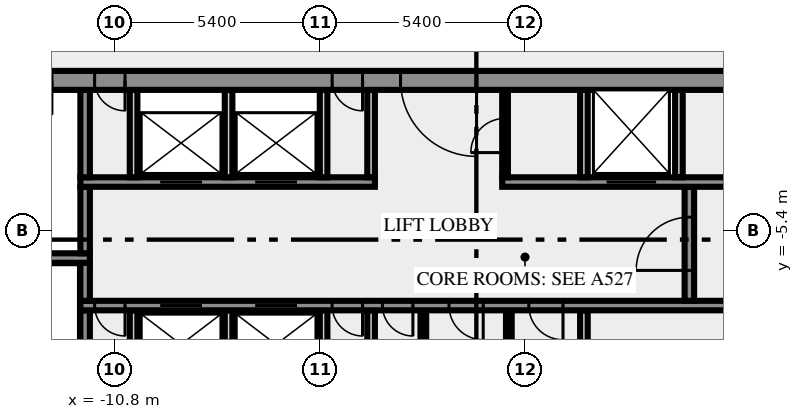
"""IFC4 building model, lengths in metres.
Left out: names, types, materials, properties, quantities, classifications, styles, units other than length and angle.
Written with IfcOpenShell. Run it as: python <this file> out.ifc"""

import sys

from ifc_helpers import new_model, si_unit, direction, frame, frame_2d, origin, place, context, subcontext, project, spatial, rectangle, extrude, element, fill, save


model = new_model("IFC4")
c1 = context("Model", 3, precision=1e-05, world=origin(), true_north=direction((0.0, 1.0)))
c2 = subcontext(c1, "Body", "Model", "MODEL_VIEW")
j1 = project(units=[si_unit("LENGTHUNIT", "METRE"), si_unit("PLANEANGLEUNIT", "RADIAN")], contexts=[c1])
p1 = place(None, origin())
s1 = spatial("IfcSite", under=j1, at=p1, CompositionType="ELEMENT")
p2 = place(p1, origin())
s2 = spatial("IfcBuilding", under=s1, at=p2, CompositionType="ELEMENT")
p3 = place(p2, frame((0.0, 0.0, 347.0)))
s3 = spatial("IfcBuildingStorey", under=s2, at=p3, CompositionType="ELEMENT", Elevation=347.0)
p4 = place(p3, frame((-11.575, -10.5, 0.0), z_axis=(0.0, 0.0, 1.0), x_axis=(0.0, 1.0, 0.0)))
e1 = element("IfcWall", 1, at=p4, inside=s3, PredefinedType="SHEAR", context=c2, shape_type="SweptSolid", body=[
    extrude(rectangle(XDim=3.0, YDim=0.25, at=frame_2d((1.5, 0.0))), origin(), (0.0, 0.0, 1.0), 3.65),
])
for number, where, z_axis, x_axis in (
    (2, (-10.3, -10.5, 0.0), (0.0, 0.0, 1.0), (0.0, 1.0, 0.0)),
    (3, (-7.8, -10.5, 0.0), (0.0, 0.0, 1.0), (0.0, 1.0, 0.0)),
    (4, (-5.3, -10.5, 0.0), (0.0, 0.0, 1.0), (0.0, 1.0, 0.0)),
    (5, (-4.05, -10.5, 0.0), (0.0, 0.0, 1.0), (0.0, 1.0, 0.0)),
):
    element("IfcWall", number, at=place(p3, frame(where, z_axis=z_axis, x_axis=x_axis)), inside=s3, PredefinedType="SOLIDWALL", context=c2, shape_type="SweptSolid", body=[
        extrude(rectangle(XDim=3.0, YDim=0.2, at=frame_2d((1.5, 0.0))), origin(), (0.0, 0.0, 1.0), 3.65),
    ])
for number, where, z_axis, x_axis in (
    (6, (-2.675, -10.5, 0.0), (0.0, 0.0, 1.0), (0.0, 1.0, 0.0)),
    (7, (-0.425, -10.5, 0.0), (0.0, 0.0, 1.0), (0.0, 1.0, 0.0)),
):
    element("IfcWall", number, at=place(p3, frame(where, z_axis=z_axis, x_axis=x_axis)), inside=s3, PredefinedType="PARTITIONING", context=c2, shape_type="SweptSolid", body=[
        extrude(rectangle(XDim=3.0, YDim=0.15, at=frame_2d((1.5, 0.0))), origin(), (0.0, 0.0, 1.0), 3.65),
    ])
p5 = place(p3, frame((1.55, -10.5, 0.0), z_axis=(0.0, 0.0, 1.0), x_axis=(0.0, 1.0, 0.0)))
e8 = element("IfcWall", 8, at=p5, inside=s3, PredefinedType="SOLIDWALL", context=c2, shape_type="SweptSolid", body=[
    extrude(rectangle(XDim=3.0, YDim=0.2, at=frame_2d((1.5, 0.0))), origin(), (0.0, 0.0, 1.0), 3.65),
])
p6 = place(p3, frame((11.7, -7.375, 0.0), z_axis=(0.0, 0.0, 1.0), x_axis=(-1.0, 0.0, 0.0)))
e9 = element("IfcWall", 9, at=p6, inside=s3, PredefinedType="SHEAR", context=c2, shape_type="SweptSolid", body=[
    extrude(rectangle(XDim=23.4, YDim=0.25, at=frame_2d((11.7, 0.0))), origin(), (0.0, 0.0, 1.0), 3.65),
])
p7 = place(p6, frame((22.225, 0.0, 0.0)))
e10 = element("IfcOpeningElement", 10, at=p7, cuts=e9, PredefinedType="OPENING", context=c2, shape_type="SweptSolid", body=[
    extrude(rectangle(XDim=0.8, YDim=2.1, at=frame_2d((0.4, 1.05))), frame((0.0, 0.135, 0.0), z_axis=(0.0, -1.0, 0.0), x_axis=(1.0, 0.0, 0.0)), (0.0, 0.0, 1.0), 0.27),
])
p8 = place(p6, frame((20.2, 0.0, 0.0)))
e11 = element("IfcOpeningElement", 11, at=p8, cuts=e9, PredefinedType="OPENING", context=c2, shape_type="SweptSolid", body=[
    extrude(rectangle(XDim=1.1, YDim=2.1, at=frame_2d((0.55, 1.05))), frame((0.0, 0.135, 0.0), z_axis=(0.0, -1.0, 0.0), x_axis=(1.0, 0.0, 0.0)), (0.0, 0.0, 1.0), 0.27),
])
p9 = place(p6, frame((17.7, 0.0, 0.0)))
e12 = element("IfcOpeningElement", 12, at=p9, cuts=e9, PredefinedType="OPENING", context=c2, shape_type="SweptSolid", body=[
    extrude(rectangle(XDim=1.1, YDim=2.1, at=frame_2d((0.55, 1.05))), frame((0.0, 0.135, 0.0), z_axis=(0.0, -1.0, 0.0), x_axis=(1.0, 0.0, 0.0)), (0.0, 0.0, 1.0), 0.27),
])
p10 = place(p6, frame((15.975, 0.0, 0.0)))
e13 = element("IfcOpeningElement", 13, at=p10, cuts=e9, PredefinedType="OPENING", context=c2, shape_type="SweptSolid", body=[
    extrude(rectangle(XDim=0.8, YDim=2.1, at=frame_2d((0.4, 1.05))), frame((0.0, 0.135, 0.0), z_axis=(0.0, -1.0, 0.0), x_axis=(1.0, 0.0, 0.0)), (0.0, 0.0, 1.0), 0.27),
])
p11 = place(p6, frame((14.65, 0.0, 0.0)))
e14 = element("IfcOpeningElement", 14, at=p11, cuts=e9, PredefinedType="OPENING", context=c2, shape_type="SweptSolid", body=[
    extrude(rectangle(XDim=0.8, YDim=2.1, at=frame_2d((0.4, 1.05))), frame((0.0, 0.135, 0.0), z_axis=(0.0, -1.0, 0.0), x_axis=(1.0, 0.0, 0.0)), (0.0, 0.0, 1.0), 0.27),
])
p12 = place(p6, frame((12.8, 0.0, 0.0)))
e15 = element("IfcOpeningElement", 15, at=p12, cuts=e9, PredefinedType="OPENING", context=c2, shape_type="SweptSolid", body=[
    extrude(rectangle(XDim=0.9, YDim=2.1, at=frame_2d((0.45, 1.05))), frame((0.0, 0.135, 0.0), z_axis=(0.0, -1.0, 0.0), x_axis=(1.0, 0.0, 0.0)), (0.0, 0.0, 1.0), 0.27),
])
p13 = place(p6, frame((10.7, 0.0, 0.0)))
e16 = element("IfcOpeningElement", 16, at=p13, cuts=e9, PredefinedType="OPENING", context=c2, shape_type="SweptSolid", body=[
    extrude(rectangle(XDim=0.9, YDim=2.1, at=frame_2d((0.45, 1.05))), frame((0.0, 0.135, 0.0), z_axis=(0.0, -1.0, 0.0), x_axis=(1.0, 0.0, 0.0)), (0.0, 0.0, 1.0), 0.27),
])
p14 = place(p6, frame((4.7, 0.0, 0.0)))
e17 = element("IfcOpeningElement", 17, at=p14, cuts=e9, PredefinedType="OPENING", context=c2, shape_type="SweptSolid", body=[
    extrude(rectangle(XDim=0.9, YDim=2.1, at=frame_2d((0.45, 1.05))), frame((0.0, 0.135, 0.0), z_axis=(0.0, -1.0, 0.0), x_axis=(1.0, 0.0, 0.0)), (0.0, 0.0, 1.0), 0.27),
])
p15 = place(p3, frame((-11.575, -7.25, 0.0), z_axis=(0.0, 0.0, 1.0), x_axis=(0.0, 1.0, 0.0)))
e18 = element("IfcWall", 18, at=p15, inside=s3, PredefinedType="SHEAR", context=c2, shape_type="SweptSolid", body=[
    extrude(rectangle(XDim=1.0, YDim=0.25, at=frame_2d((0.5, 0.0))), origin(), (0.0, 0.0, 1.0), 3.65),
])
p16 = place(p3, frame((4.325, -7.25, 0.0), z_axis=(0.0, 0.0, 1.0), x_axis=(0.0, 1.0, 0.0)))
e19 = element("IfcWall", 19, at=p16, inside=s3, PredefinedType="SHEAR", context=c2, shape_type="SweptSolid", body=[
    extrude(rectangle(XDim=3.0, YDim=0.25, at=frame_2d((1.5, 0.0))), origin(), (0.0, 0.0, 1.0), 3.65),
])
p17 = place(p16, frame((0.8, 0.0, 0.0)))
e20 = element("IfcOpeningElement", 20, at=p17, cuts=e19, PredefinedType="OPENING", context=c2, shape_type="SweptSolid", body=[
    extrude(rectangle(XDim=1.4, YDim=2.1, at=frame_2d((0.7, 1.05))), frame((0.0, 0.135, 0.0), z_axis=(0.0, -1.0, 0.0), x_axis=(1.0, 0.0, 0.0)), (0.0, 0.0, 1.0), 0.27),
])
p18 = place(p3, frame((-11.45, -6.125, 0.0), z_axis=(0.0, 0.0, 1.0), x_axis=(-1.0, 0.0, 0.0)))
e21 = element("IfcWall", 21, at=p18, inside=s3, PredefinedType="SHEAR", context=c2, shape_type="SweptSolid", body=[
    extrude(rectangle(XDim=8.05, YDim=0.25, at=frame_2d((4.025, 0.0))), origin(), (0.0, 0.0, 1.0), 3.65),
])
p19 = place(p18, frame((6.2, 0.0, 0.0)))
e22 = element("IfcOpeningElement", 22, at=p19, cuts=e21, PredefinedType="OPENING", context=c2, shape_type="SweptSolid", body=[
    extrude(rectangle(XDim=1.8, YDim=2.1, at=frame_2d((0.9, 1.05))), frame((0.0, 0.135, 0.0), z_axis=(0.0, -1.0, 0.0), x_axis=(1.0, 0.0, 0.0)), (0.0, 0.0, 1.0), 0.27),
])
p20 = place(p3, frame((-11.575, -6.0, 0.0), z_axis=(0.0, 0.0, 1.0), x_axis=(0.0, 1.0, 0.0)))
e23 = element("IfcWall", 23, at=p20, inside=s3, PredefinedType="SHEAR", context=c2, shape_type="SweptSolid", body=[
    extrude(rectangle(XDim=1.75, YDim=0.25, at=frame_2d((0.875, 0.0))), origin(), (0.0, 0.0, 1.0), 3.65),
])
p21 = place(p3, frame((-11.7, -4.125, 0.0), z_axis=(0.0, 0.0, 1.0), x_axis=(1.0, 0.0, 0.0)))
e24 = element("IfcWall", 24, at=p21, inside=s3, PredefinedType="SHEAR", context=c2, shape_type="SweptSolid", body=[
    extrude(rectangle(XDim=7.75, YDim=0.25, at=frame_2d((3.875, 0.0))), origin(), (0.0, 0.0, 1.0), 3.65),
])
p22 = place(p21, frame((2.1, 0.0, 0.0)))
e25 = element("IfcOpeningElement", 25, at=p22, cuts=e24, PredefinedType="OPENING", context=c2, shape_type="SweptSolid", body=[
    extrude(rectangle(XDim=1.1, YDim=2.1, at=frame_2d((0.55, 1.05))), frame((0.0, 0.135, 0.0), z_axis=(0.0, -1.0, 0.0), x_axis=(1.0, 0.0, 0.0)), (0.0, 0.0, 1.0), 0.27),
])
p23 = place(p21, frame((4.6, 0.0, 0.0)))
e26 = element("IfcOpeningElement", 26, at=p23, cuts=e24, PredefinedType="OPENING", context=c2, shape_type="SweptSolid", body=[
    extrude(rectangle(XDim=1.1, YDim=2.1, at=frame_2d((0.55, 1.05))), frame((0.0, 0.135, 0.0), z_axis=(0.0, -1.0, 0.0), x_axis=(1.0, 0.0, 0.0)), (0.0, 0.0, 1.0), 0.27),
])
p24 = place(p3, frame((-0.6, -4.125, 0.0), z_axis=(0.0, 0.0, 1.0), x_axis=(1.0, 0.0, 0.0)))
e27 = element("IfcWall", 27, at=p24, inside=s3, PredefinedType="SHEAR", context=c2, shape_type="SweptSolid", body=[
    extrude(rectangle(XDim=12.3, YDim=0.25, at=frame_2d((6.15, 0.0))), origin(), (0.0, 0.0, 1.0), 3.65),
])
p25 = place(p24, frame((2.75, 0.0, 0.0)))
e28 = element("IfcOpeningElement", 28, at=p25, cuts=e27, PredefinedType="OPENING", context=c2, shape_type="SweptSolid", body=[
    extrude(rectangle(XDim=1.3, YDim=2.1, at=frame_2d((0.65, 1.05))), frame((0.0, 0.135, 0.0), z_axis=(0.0, -1.0, 0.0), x_axis=(1.0, 0.0, 0.0)), (0.0, 0.0, 1.0), 0.27),
])
p26 = place(p3, frame((-11.575, -4.0, 0.0), z_axis=(0.0, 0.0, 1.0), x_axis=(0.0, 1.0, 0.0)))
e29 = element("IfcWall", 29, at=p26, inside=s3, PredefinedType="SHEAR", context=c2, shape_type="SweptSolid", body=[
    extrude(rectangle(XDim=2.3, YDim=0.25, at=frame_2d((1.15, 0.0))), origin(), (0.0, 0.0, 1.0), 3.65),
])
for number, where, z_axis, x_axis in (
    (30, (-10.3, -4.0, 0.0), (0.0, 0.0, 1.0), (0.0, 1.0, 0.0)),
    (31, (-7.8, -4.0, 0.0), (0.0, 0.0, 1.0), (0.0, 1.0, 0.0)),
    (32, (-5.3, -4.0, 0.0), (0.0, 0.0, 1.0), (0.0, 1.0, 0.0)),
    (33, (-4.05, -4.0, 0.0), (0.0, 0.0, 1.0), (0.0, 1.0, 0.0)),
):
    element("IfcWall", number, at=place(p3, frame(where, z_axis=z_axis, x_axis=x_axis)), inside=s3, PredefinedType="SOLIDWALL", context=c2, shape_type="SweptSolid", body=[
        extrude(rectangle(XDim=2.3, YDim=0.2, at=frame_2d((1.15, 0.0))), origin(), (0.0, 0.0, 1.0), 3.65),
    ])
p27 = place(p3, frame((-0.525, -4.0, 0.0), z_axis=(0.0, 0.0, 1.0), x_axis=(0.0, 1.0, 0.0)))
e34 = element("IfcWall", 34, at=p27, inside=s3, PredefinedType="PARTITIONING", context=c2, shape_type="SweptSolid", body=[
    extrude(rectangle(XDim=2.3, YDim=0.15, at=frame_2d((1.15, 0.0))), origin(), (0.0, 0.0, 1.0), 3.65),
])
p28 = place(p27, frame((0.65, 0.0, 0.0)))
e35 = element("IfcOpeningElement", 35, at=p28, cuts=e34, PredefinedType="OPENING", context=c2, shape_type="SweptSolid", body=[
    extrude(rectangle(XDim=0.9, YDim=2.1, at=frame_2d((0.45, 1.05))), frame((0.0, 0.085, 0.0), z_axis=(0.0, -1.0, 0.0), x_axis=(1.0, 0.0, 0.0)), (0.0, 0.0, 1.0), 0.17),
])
for number, where, z_axis, x_axis in (
    (36, (1.55, -4.0, 0.0), (0.0, 0.0, 1.0), (0.0, 1.0, 0.0)),
    (37, (4.05, -4.0, 0.0), (0.0, 0.0, 1.0), (0.0, 1.0, 0.0)),
):
    element("IfcWall", number, at=place(p3, frame(where, z_axis=z_axis, x_axis=x_axis)), inside=s3, PredefinedType="SOLIDWALL", context=c2, shape_type="SweptSolid", body=[
        extrude(rectangle(XDim=2.3, YDim=0.2, at=frame_2d((1.15, 0.0))), origin(), (0.0, 0.0, 1.0), 3.65),
    ])
p29 = place(p3, frame((20.49, -1.45, 0.0), z_axis=(0.0, 0.0, 1.0), x_axis=(-1.0, 0.0, 0.0)))
e38 = element("IfcWall", 38, at=p29, inside=s3, PredefinedType="SHEAR", context=c2, shape_type="SweptSolid", body=[
    extrude(rectangle(XDim=40.98, YDim=0.5, at=frame_2d((20.49, 0.0))), origin(), (0.0, 0.0, 1.0), 3.65),
])
p30 = place(p29, frame((38.14, 0.0, 0.0)))
e39 = element("IfcOpeningElement", 39, at=p30, cuts=e38, PredefinedType="OPENING", context=c2, shape_type="SweptSolid", body=[
    extrude(rectangle(XDim=1.8, YDim=2.1, at=frame_2d((0.9, 1.05))), frame((0.0, 0.26, 0.0), z_axis=(0.0, -1.0, 0.0), x_axis=(1.0, 0.0, 0.0)), (0.0, 0.0, 1.0), 0.52),
])
p31 = place(p29, frame((36.728, 0.0, 0.0)))
e40 = element("IfcOpeningElement", 40, at=p31, cuts=e38, PredefinedType="OPENING", context=c2, shape_type="SweptSolid", body=[
    extrude(rectangle(XDim=0.8, YDim=2.1, at=frame_2d((0.4, 1.05))), frame((0.0, 0.26, 0.0), z_axis=(0.0, -1.0, 0.0), x_axis=(1.0, 0.0, 0.0)), (0.0, 0.0, 1.0), 0.52),
])
p32 = place(p29, frame((35.153, 0.0, 0.0)))
e41 = element("IfcOpeningElement", 41, at=p32, cuts=e38, PredefinedType="OPENING", context=c2, shape_type="SweptSolid", body=[
    extrude(rectangle(XDim=0.8, YDim=2.1, at=frame_2d((0.4, 1.05))), frame((0.0, 0.26, 0.0), z_axis=(0.0, -1.0, 0.0), x_axis=(1.0, 0.0, 0.0)), (0.0, 0.0, 1.0), 0.52),
])
p33 = place(p29, frame((32.94, 0.0, 0.0)))
e42 = element("IfcOpeningElement", 42, at=p33, cuts=e38, PredefinedType="OPENING", context=c2, shape_type="SweptSolid", body=[
    extrude(rectangle(XDim=0.9, YDim=2.1, at=frame_2d((0.45, 1.05))), frame((0.0, 0.26, 0.0), z_axis=(0.0, -1.0, 0.0), x_axis=(1.0, 0.0, 0.0)), (0.0, 0.0, 1.0), 0.52),
])
p34 = place(p29, frame((31.015, 0.0, 0.0)))
e43 = element("IfcOpeningElement", 43, at=p34, cuts=e38, PredefinedType="OPENING", context=c2, shape_type="SweptSolid", body=[
    extrude(rectangle(XDim=0.8, YDim=2.1, at=frame_2d((0.4, 1.05))), frame((0.0, 0.26, 0.0), z_axis=(0.0, -1.0, 0.0), x_axis=(1.0, 0.0, 0.0)), (0.0, 0.0, 1.0), 0.52),
])
p35 = place(p29, frame((24.765, 0.0, 0.0)))
e44 = element("IfcOpeningElement", 44, at=p35, cuts=e38, PredefinedType="OPENING", context=c2, shape_type="SweptSolid", body=[
    extrude(rectangle(XDim=0.8, YDim=2.1, at=frame_2d((0.4, 1.05))), frame((0.0, 0.26, 0.0), z_axis=(0.0, -1.0, 0.0), x_axis=(1.0, 0.0, 0.0)), (0.0, 0.0, 1.0), 0.52),
])
p36 = place(p29, frame((21.765, 0.0, 0.0)))
e45 = element("IfcOpeningElement", 45, at=p36, cuts=e38, PredefinedType="OPENING", context=c2, shape_type="SweptSolid", body=[
    extrude(rectangle(XDim=2.0, YDim=2.1, at=frame_2d((1.0, 1.05))), frame((0.0, 0.26, 0.0), z_axis=(0.0, -1.0, 0.0), x_axis=(1.0, 0.0, 0.0)), (0.0, 0.0, 1.0), 0.52),
])
p37 = place(p29, frame((14.002, 0.0, 0.0)))
e46 = element("IfcOpeningElement", 46, at=p37, cuts=e38, PredefinedType="OPENING", context=c2, shape_type="SweptSolid", body=[
    extrude(rectangle(XDim=0.9, YDim=2.1, at=frame_2d((0.45, 1.05))), frame((0.0, 0.26, 0.0), z_axis=(0.0, -1.0, 0.0), x_axis=(1.0, 0.0, 0.0)), (0.0, 0.0, 1.0), 0.52),
])
p38 = place(p29, frame((10.278, 0.0, 0.0)))
e47 = element("IfcOpeningElement", 47, at=p38, cuts=e38, PredefinedType="OPENING", context=c2, shape_type="SweptSolid", body=[
    extrude(rectangle(XDim=0.9, YDim=2.1, at=frame_2d((0.45, 1.05))), frame((0.0, 0.26, 0.0), z_axis=(0.0, -1.0, 0.0), x_axis=(1.0, 0.0, 0.0)), (0.0, 0.0, 1.0), 0.52),
])
p39 = place(p29, frame((7.14, 0.0, 0.0)))
e48 = element("IfcOpeningElement", 48, at=p39, cuts=e38, PredefinedType="OPENING", context=c2, shape_type="SweptSolid", body=[
    extrude(rectangle(XDim=0.9, YDim=2.1, at=frame_2d((0.45, 1.05))), frame((0.0, 0.26, 0.0), z_axis=(0.0, -1.0, 0.0), x_axis=(1.0, 0.0, 0.0)), (0.0, 0.0, 1.0), 0.52),
])
p40 = place(p29, frame((4.19, 0.0, 0.0)))
e49 = element("IfcOpeningElement", 49, at=p40, cuts=e38, PredefinedType="OPENING", context=c2, shape_type="SweptSolid", body=[
    extrude(rectangle(XDim=0.9, YDim=2.1, at=frame_2d((0.45, 1.05))), frame((0.0, 0.26, 0.0), z_axis=(0.0, -1.0, 0.0), x_axis=(1.0, 0.0, 0.0)), (0.0, 0.0, 1.0), 0.52),
])
p41 = place(p29, frame((1.04, 0.0, 0.0)))
e50 = element("IfcOpeningElement", 50, at=p41, cuts=e38, PredefinedType="OPENING", context=c2, shape_type="SweptSolid", body=[
    extrude(rectangle(XDim=1.8, YDim=2.1, at=frame_2d((0.9, 1.05))), frame((0.0, 0.26, 0.0), z_axis=(0.0, -1.0, 0.0), x_axis=(1.0, 0.0, 0.0)), (0.0, 0.0, 1.0), 0.52),
])
p42 = place(p7, origin())
e51 = element("IfcDoor", 51, at=p42, inside=s3, OperationType="SINGLE_SWING_RIGHT", PredefinedType="DOOR", context=c2, shape_type="SweptSolid", body=[
    extrude(rectangle(XDim=0.8, YDim=2.1, at=frame_2d((0.4, 1.05))), frame((0.0, 0.025, 0.0), z_axis=(0.0, -1.0, 0.0), x_axis=(1.0, 0.0, 0.0)), (0.0, 0.0, 1.0), 0.05),
])
fill(e10, e51)
p43 = place(p8, origin())
e52 = element("IfcDoor", 52, at=p43, inside=s3, OperationType="DOUBLE_DOOR_SLIDING", PredefinedType="DOOR", context=c2, shape_type="SweptSolid", body=[
    extrude(rectangle(XDim=1.1, YDim=2.1, at=frame_2d((0.55, 1.05))), frame((0.0, 0.025, 0.0), z_axis=(0.0, -1.0, 0.0), x_axis=(1.0, 0.0, 0.0)), (0.0, 0.0, 1.0), 0.05),
])
fill(e11, e52)
p44 = place(p9, origin())
e53 = element("IfcDoor", 53, at=p44, inside=s3, OperationType="DOUBLE_DOOR_SLIDING", PredefinedType="DOOR", context=c2, shape_type="SweptSolid", body=[
    extrude(rectangle(XDim=1.1, YDim=2.1, at=frame_2d((0.55, 1.05))), frame((0.0, 0.025, 0.0), z_axis=(0.0, -1.0, 0.0), x_axis=(1.0, 0.0, 0.0)), (0.0, 0.0, 1.0), 0.05),
])
fill(e12, e53)
p45 = place(p10, origin())
e54 = element("IfcDoor", 54, at=p45, inside=s3, OperationType="SINGLE_SWING_RIGHT", PredefinedType="DOOR", context=c2, shape_type="SweptSolid", body=[
    extrude(rectangle(XDim=0.8, YDim=2.1, at=frame_2d((0.4, 1.05))), frame((0.0, 0.025, 0.0), z_axis=(0.0, -1.0, 0.0), x_axis=(1.0, 0.0, 0.0)), (0.0, 0.0, 1.0), 0.05),
])
fill(e13, e54)
p46 = place(p11, origin())
e55 = element("IfcDoor", 55, at=p46, inside=s3, OperationType="SINGLE_SWING_RIGHT", PredefinedType="DOOR", context=c2, shape_type="SweptSolid", body=[
    extrude(rectangle(XDim=0.8, YDim=2.1, at=frame_2d((0.4, 1.05))), frame((0.0, 0.025, 0.0), z_axis=(0.0, -1.0, 0.0), x_axis=(1.0, 0.0, 0.0)), (0.0, 0.0, 1.0), 0.05),
])
fill(e14, e55)
p47 = place(p12, origin())
e56 = element("IfcDoor", 56, at=p47, inside=s3, OperationType="SINGLE_SWING_RIGHT", PredefinedType="DOOR", context=c2, shape_type="SweptSolid", body=[
    extrude(rectangle(XDim=0.9, YDim=2.1, at=frame_2d((0.45, 1.05))), frame((0.0, 0.025, 0.0), z_axis=(0.0, -1.0, 0.0), x_axis=(1.0, 0.0, 0.0)), (0.0, 0.0, 1.0), 0.05),
])
fill(e15, e56)
p48 = place(p13, origin())
e57 = element("IfcDoor", 57, at=p48, inside=s3, OperationType="SINGLE_SWING_LEFT", PredefinedType="DOOR", context=c2, shape_type="SweptSolid", body=[
    extrude(rectangle(XDim=0.9, YDim=2.1, at=frame_2d((0.45, 1.05))), frame((0.0, 0.025, 0.0), z_axis=(0.0, -1.0, 0.0), x_axis=(1.0, 0.0, 0.0)), (0.0, 0.0, 1.0), 0.05),
])
fill(e16, e57)
p49 = place(p17, origin())
e58 = element("IfcDoor", 58, at=p49, inside=s3, OperationType="DOUBLE_DOOR_SINGLE_SWING", PredefinedType="DOOR", context=c2, shape_type="SweptSolid", body=[
    extrude(rectangle(XDim=1.4, YDim=2.1, at=frame_2d((0.7, 1.05))), frame((0.0, 0.025, 0.0), z_axis=(0.0, -1.0, 0.0), x_axis=(1.0, 0.0, 0.0)), (0.0, 0.0, 1.0), 0.05),
])
fill(e20, e58)
p50 = place(p22, origin())
e59 = element("IfcDoor", 59, at=p50, inside=s3, OperationType="DOUBLE_DOOR_SLIDING", PredefinedType="DOOR", context=c2, shape_type="SweptSolid", body=[
    extrude(rectangle(XDim=1.1, YDim=2.1, at=frame_2d((0.55, 1.05))), frame((0.0, 0.025, 0.0), z_axis=(0.0, -1.0, 0.0), x_axis=(1.0, 0.0, 0.0)), (0.0, 0.0, 1.0), 0.05),
])
fill(e25, e59)
p51 = place(p23, origin())
e60 = element("IfcDoor", 60, at=p51, inside=s3, OperationType="DOUBLE_DOOR_SLIDING", PredefinedType="DOOR", context=c2, shape_type="SweptSolid", body=[
    extrude(rectangle(XDim=1.1, YDim=2.1, at=frame_2d((0.55, 1.05))), frame((0.0, 0.025, 0.0), z_axis=(0.0, -1.0, 0.0), x_axis=(1.0, 0.0, 0.0)), (0.0, 0.0, 1.0), 0.05),
])
fill(e26, e60)
p52 = place(p25, origin())
e61 = element("IfcDoor", 61, at=p52, inside=s3, OperationType="DOUBLE_DOOR_SLIDING", PredefinedType="DOOR", context=c2, shape_type="SweptSolid", body=[
    extrude(rectangle(XDim=1.3, YDim=2.1, at=frame_2d((0.65, 1.05))), frame((0.0, 0.025, 0.0), z_axis=(0.0, -1.0, 0.0), x_axis=(1.0, 0.0, 0.0)), (0.0, 0.0, 1.0), 0.05),
])
fill(e28, e61)
p53 = place(p28, origin())
e62 = element("IfcDoor", 62, at=p53, inside=s3, OperationType="SINGLE_SWING_LEFT", PredefinedType="DOOR", context=c2, shape_type="SweptSolid", body=[
    extrude(rectangle(XDim=0.9, YDim=2.1, at=frame_2d((0.45, 1.05))), frame((0.0, 0.025, 0.0), z_axis=(0.0, -1.0, 0.0), x_axis=(1.0, 0.0, 0.0)), (0.0, 0.0, 1.0), 0.05),
])
fill(e35, e62)
p54 = place(p34, origin())
e63 = element("IfcDoor", 63, at=p54, inside=s3, OperationType="SINGLE_SWING_RIGHT", PredefinedType="DOOR", context=c2, shape_type="SweptSolid", body=[
    extrude(rectangle(XDim=0.8, YDim=2.1, at=frame_2d((0.4, 1.05))), frame((0.0, 0.025, 0.0), z_axis=(0.0, -1.0, 0.0), x_axis=(1.0, 0.0, 0.0)), (0.0, 0.0, 1.0), 0.05),
])
fill(e43, e63)
p55 = place(p35, origin())
e64 = element("IfcDoor", 64, at=p55, inside=s3, OperationType="SINGLE_SWING_RIGHT", PredefinedType="DOOR", context=c2, shape_type="SweptSolid", body=[
    extrude(rectangle(XDim=0.8, YDim=2.1, at=frame_2d((0.4, 1.05))), frame((0.0, 0.025, 0.0), z_axis=(0.0, -1.0, 0.0), x_axis=(1.0, 0.0, 0.0)), (0.0, 0.0, 1.0), 0.05),
])
fill(e44, e64)
p56 = place(p36, origin())
e65 = element("IfcDoor", 65, at=p56, inside=s3, OperationType="DOUBLE_DOOR_SINGLE_SWING", PredefinedType="DOOR", context=c2, shape_type="SweptSolid", body=[
    extrude(rectangle(XDim=2.0, YDim=2.1, at=frame_2d((1.0, 1.05))), frame((0.0, 0.025, 0.0), z_axis=(0.0, -1.0, 0.0), x_axis=(1.0, 0.0, 0.0)), (0.0, 0.0, 1.0), 0.05),
])
fill(e45, e65)
save(model, sys.argv[1])
